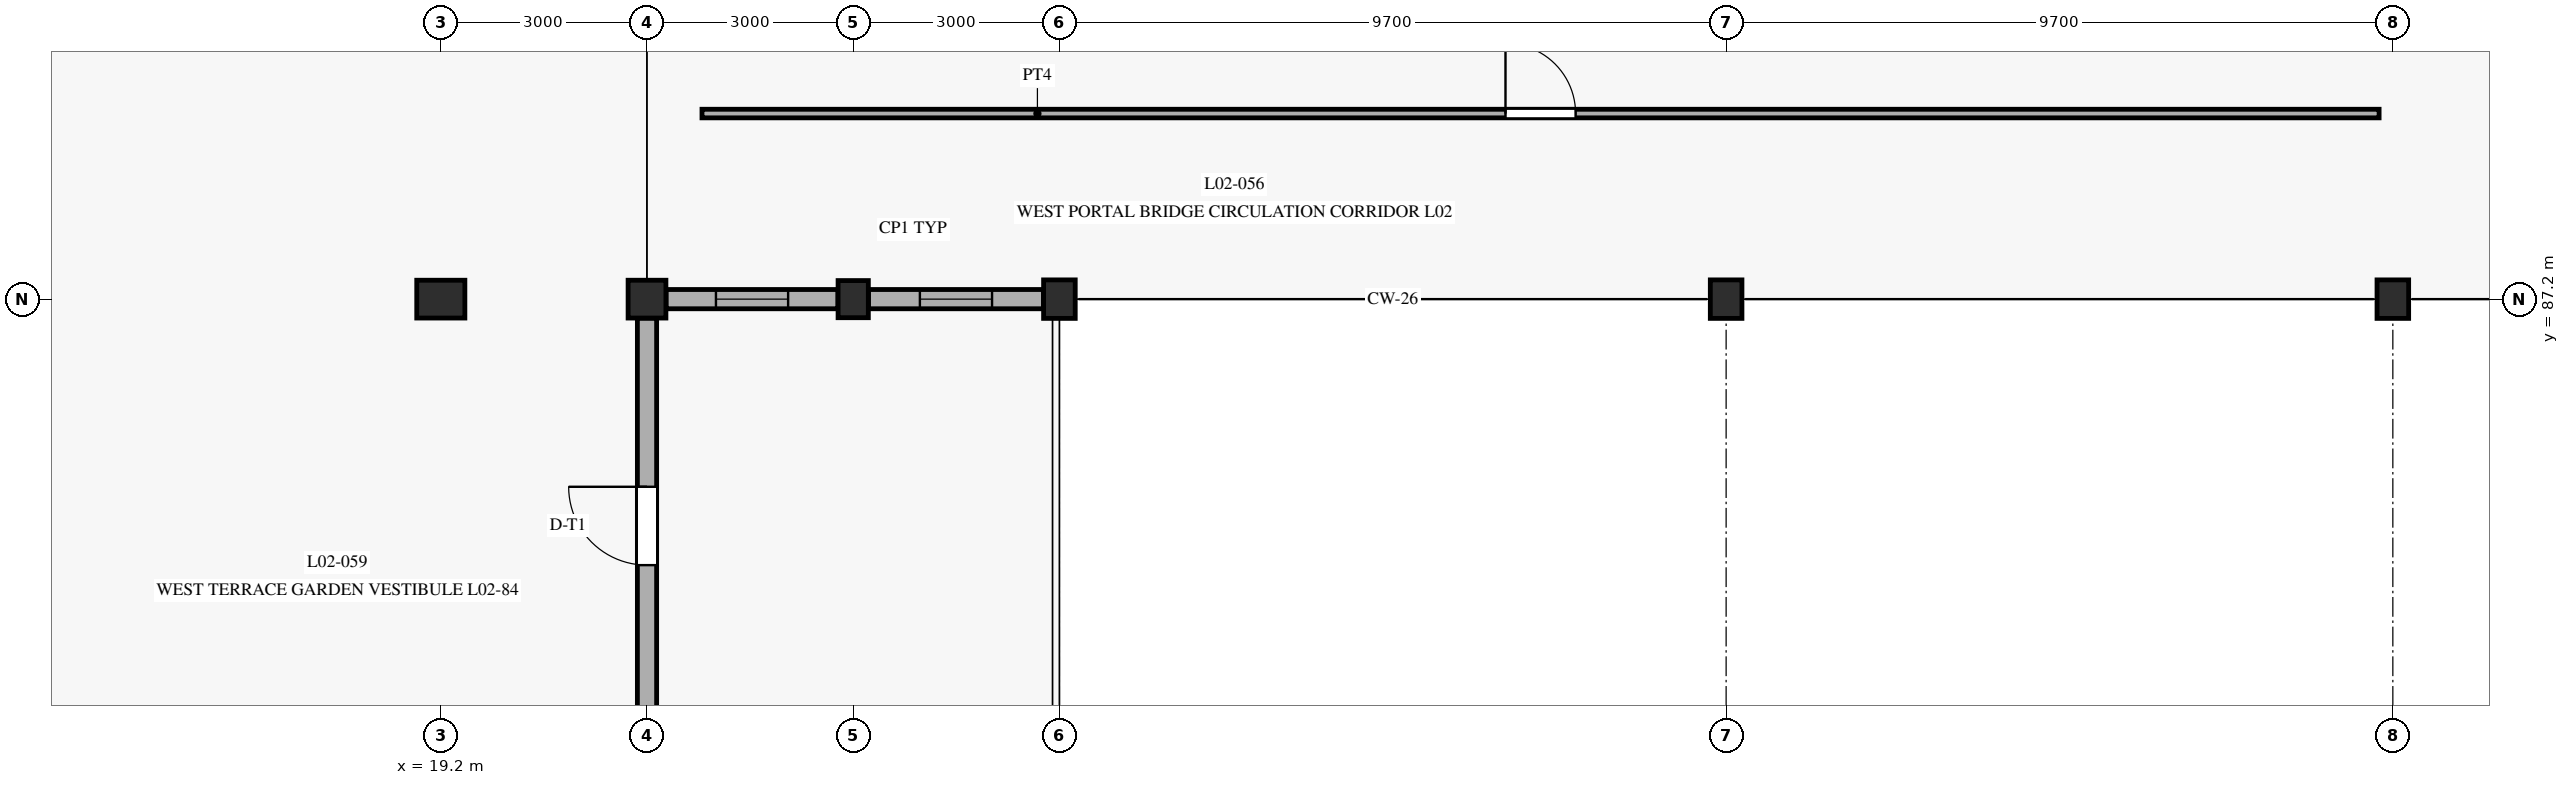
"""IFC4 building model, lengths in metres.
Left out: names, types, materials, properties, quantities, classifications, styles, units other than length and angle.
Written with IfcOpenShell. Run it as: python <this file> out.ifc"""

import sys

from ifc_helpers import new_model, si_unit, direction, frame, frame_2d, origin, origin_with_axes, origin_2d, place, context, subcontext, project, spatial, rectangle, extrude, element, fill, save


model = new_model("IFC4")
c1 = context("Model", 3, precision=1e-05, world=origin(), true_north=direction((0.0, 1.0)))
c2 = subcontext(c1, "Body", "Model", "MODEL_VIEW")
j1 = project(units=[si_unit("LENGTHUNIT", "METRE"), si_unit("PLANEANGLEUNIT", "RADIAN")], contexts=[c1])
p1 = place(None, origin())
s1 = spatial("IfcSite", under=j1, at=p1, CompositionType="ELEMENT")
p2 = place(p1, origin())
s2 = spatial("IfcBuilding", under=s1, at=p2, CompositionType="ELEMENT")
p3 = place(p2, frame((0.0, 0.0, 4.8)))
s3 = spatial("IfcBuildingStorey", under=s2, at=p3, CompositionType="ELEMENT", Elevation=4.8)
p4 = place(p3, frame((19.2, 87.2, 0.0), z_axis=(0.0, 0.0, 1.0), x_axis=(1.0, 0.0, 0.0)))
e1 = element("IfcColumn", 1, at=p4, inside=s3, PredefinedType="COLUMN", context=c2, shape_type="SweptSolid", body=[
    extrude(rectangle(XDim=0.7, YDim=0.55, at=origin_2d()), origin(), (0.0, 0.0, 1.0), 4.5),
])
p5 = place(p3, frame((22.2, 87.2, 0.0), z_axis=(0.0, 0.0, 1.0), x_axis=(1.0, 0.0, 0.0)))
e2 = element("IfcColumn", 2, at=p5, inside=s3, PredefinedType="COLUMN", context=c2, shape_type="SweptSolid", body=[
    extrude(rectangle(XDim=0.55, YDim=0.55, at=origin_2d()), origin(), (0.0, 0.0, 1.0), 4.5),
])
p6 = place(p3, frame((25.2, 87.2, 0.0), z_axis=(0.0, 0.0, 1.0), x_axis=(1.0, 0.0, 0.0)))
e3 = element("IfcColumn", 3, at=p6, inside=s3, PredefinedType="PILASTER", context=c2, shape_type="SweptSolid", body=[
    extrude(rectangle(XDim=0.44, YDim=0.54, at=origin_2d()), origin(), (0.0, 0.0, 1.0), 4.5),
])
for number, where, z_axis, x_axis in (
    (4, (28.2, 87.2, 0.0), (0.0, 0.0, 1.0), (1.0, 0.0, 0.0)),
    (5, (37.9, 87.2, 0.0), (0.0, 0.0, 1.0), (1.0, 0.0, 0.0)),
    (6, (47.6, 87.2, 0.0), (0.0, 0.0, 1.0), (1.0, 0.0, 0.0)),
):
    element("IfcColumn", number, at=place(p3, frame(where, z_axis=z_axis, x_axis=x_axis)), inside=s3, PredefinedType="COLUMN", context=c2, shape_type="SweptSolid", body=[
        extrude(rectangle(XDim=0.46, YDim=0.56, at=origin_2d()), origin(), (0.0, 0.0, 1.0), 4.5),
    ])
p7 = place(p3, frame((22.2, 80.877, 0.0), z_axis=(0.0, 0.0, 1.0), x_axis=(0.0, 1.0, 0.0)))
e7 = element("IfcWall", 7, at=p7, inside=s3, PredefinedType="SOLIDWALL", context=c2, shape_type="SweptSolid", body=[
    extrude(rectangle(XDim=6.046, YDim=0.28, at=frame_2d((3.023, 0.0))), origin(), (0.0, 0.0, 1.0), 3.74),
])
p8 = place(p7, frame((2.453, 0.0, 0.0)))
e8 = element("IfcOpeningElement", 8, at=p8, cuts=e7, PredefinedType="OPENING", context=c2, shape_type="SweptSolid", body=[
    extrude(rectangle(XDim=1.14, YDim=2.3, at=frame_2d((0.57, 1.15))), frame((0.0, 0.15, 0.0), z_axis=(0.0, -1.0, 0.0), x_axis=(1.0, 0.0, 0.0)), (0.0, 0.0, 1.0), 0.3),
])
p9 = place(p3, frame((22.477, 87.2, 0.0), z_axis=(0.0, 0.0, 1.0), x_axis=(1.0, 0.0, 0.0)))
e9 = element("IfcWall", 9, at=p9, inside=s3, PredefinedType="SOLIDWALL", context=c2, shape_type="SweptSolid", body=[
    extrude(rectangle(XDim=2.501, YDim=0.28, at=frame_2d((1.25, 0.0))), origin(), (0.0, 0.0, 1.0), 3.84),
])
p10 = place(p9, frame((0.726, 0.0, 0.85)))
e10 = element("IfcOpeningElement", 10, at=p10, cuts=e9, PredefinedType="OPENING", context=c2, shape_type="SweptSolid", body=[
    extrude(rectangle(XDim=1.05, YDim=2.2, at=frame_2d((0.525, 1.1))), frame((0.0, 0.15, 0.0), z_axis=(0.0, -1.0, 0.0), x_axis=(1.0, 0.0, 0.0)), (0.0, 0.0, 1.0), 0.3),
])
p11 = place(p3, frame((25.422, 87.2, 0.0), z_axis=(0.0, 0.0, 1.0), x_axis=(1.0, 0.0, 0.0)))
e11 = element("IfcWall", 11, at=p11, inside=s3, PredefinedType="SOLIDWALL", context=c2, shape_type="SweptSolid", body=[
    extrude(rectangle(XDim=2.546, YDim=0.28, at=frame_2d((1.273, 0.0))), origin(), (0.0, 0.0, 1.0), 3.89),
])
p12 = place(p11, frame((0.748, 0.0, 0.85)))
e12 = element("IfcOpeningElement", 12, at=p12, cuts=e11, PredefinedType="OPENING", context=c2, shape_type="SweptSolid", body=[
    extrude(rectangle(XDim=1.05, YDim=2.2, at=frame_2d((0.525, 1.1))), frame((0.0, 0.15, 0.0), z_axis=(0.0, -1.0, 0.0), x_axis=(1.0, 0.0, 0.0)), (0.0, 0.0, 1.0), 0.3),
])
p13 = place(p3, frame((23.0, 89.9, 0.0), z_axis=(0.0, 0.0, 1.0), x_axis=(1.0, 0.0, 0.0)))
e13 = element("IfcWall", 13, at=p13, inside=s3, PredefinedType="PARTITIONING", context=c2, shape_type="SweptSolid", body=[
    extrude(rectangle(XDim=24.4, YDim=0.125, at=frame_2d((12.2, 0.0))), origin(), (0.0, 0.0, 1.0), 3.785),
])
p14 = place(p13, frame((11.69, 0.0, 0.0)))
e14 = element("IfcOpeningElement", 14, at=p14, cuts=e13, PredefinedType="OPENING", context=c2, shape_type="SweptSolid", body=[
    extrude(rectangle(XDim=1.02, YDim=2.18, at=frame_2d((0.51, 1.09))), frame((0.0, 0.073, 0.0), z_axis=(0.0, -1.0, 0.0), x_axis=(1.0, 0.0, 0.0)), (0.0, 0.0, 1.0), 0.145),
])
p15 = place(p8, frame((1.14, 0.0, 0.0), z_axis=(0.0, 0.0, 1.0), x_axis=(-1.0, 0.0, 0.0)))
e15 = element("IfcDoor", 15, at=p15, inside=s3, OperationType="SINGLE_SWING_LEFT", PredefinedType="DOOR", context=c2, shape_type="SweptSolid", body=[
    extrude(rectangle(XDim=1.14, YDim=2.3, at=frame_2d((0.57, 1.15))), frame((0.0, 0.025, 0.0), z_axis=(0.0, -1.0, 0.0), x_axis=(1.0, 0.0, 0.0)), (0.0, 0.0, 1.0), 0.05),
])
fill(e8, e15)
p16 = place(p10, origin_with_axes())
e16 = element("IfcWindow", 16, at=p16, inside=s3, PartitioningType="SINGLE_PANEL", PredefinedType="WINDOW", context=c2, shape_type="SweptSolid", body=[
    extrude(rectangle(XDim=1.05, YDim=2.2, at=frame_2d((0.525, 1.1))), frame((0.0, 0.03, 0.0), z_axis=(0.0, -1.0, 0.0), x_axis=(1.0, 0.0, 0.0)), (0.0, 0.0, 1.0), 0.06),
])
fill(e10, e16)
p17 = place(p12, origin_with_axes())
e17 = element("IfcWindow", 17, at=p17, inside=s3, PartitioningType="SINGLE_PANEL", PredefinedType="WINDOW", context=c2, shape_type="SweptSolid", body=[
    extrude(rectangle(XDim=1.05, YDim=2.2, at=frame_2d((0.525, 1.1))), frame((0.0, 0.03, 0.0), z_axis=(0.0, -1.0, 0.0), x_axis=(1.0, 0.0, 0.0)), (0.0, 0.0, 1.0), 0.06),
])
fill(e12, e17)
p18 = place(p14, origin_with_axes())
e18 = element("IfcDoor", 18, at=p18, inside=s3, OperationType="SINGLE_SWING_LEFT", PredefinedType="DOOR", context=c2, shape_type="SweptSolid", body=[
    extrude(rectangle(XDim=1.02, YDim=2.18, at=frame_2d((0.51, 1.09))), frame((0.0, 0.025, 0.0), z_axis=(0.0, -1.0, 0.0), x_axis=(1.0, 0.0, 0.0)), (0.0, 0.0, 1.0), 0.05),
])
fill(e14, e18)
save(model, sys.argv[1])
